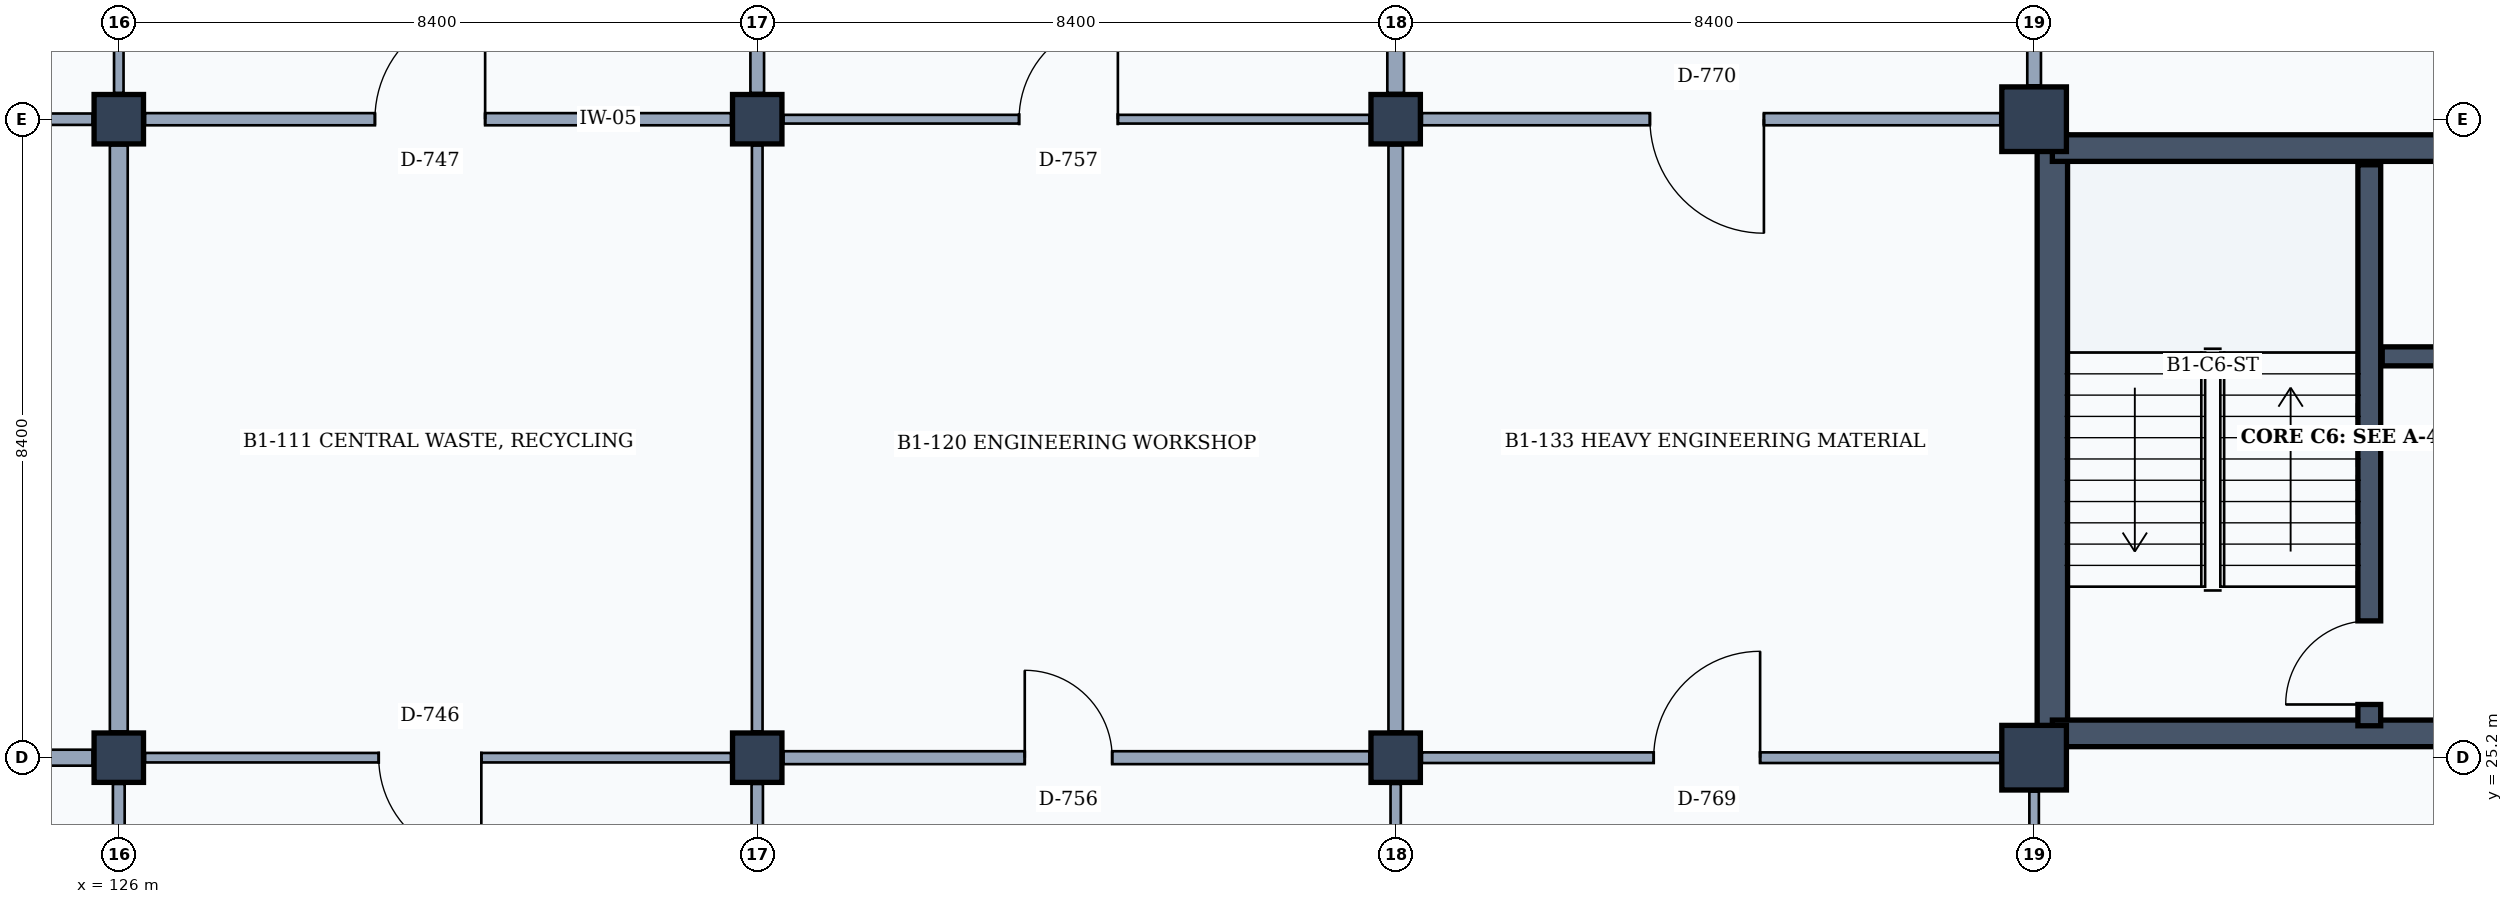
"""IFC4 building model, lengths in metres.
Left out: names, types, materials, properties, quantities, classifications, styles, units other than length and angle.
Written with IfcOpenShell. Run it as: python <this file> out.ifc"""

import sys

from ifc_helpers import new_model, si_unit, direction, frame, frame_2d, origin, origin_2d, place, context, subcontext, project, spatial, rectangle, extrude, element, fill, save


model = new_model("IFC4")
c1 = context("Model", 3, precision=1e-05, world=origin(), true_north=direction((0.0, 1.0)))
c2 = subcontext(c1, "Body", "Model", "MODEL_VIEW")
j1 = project(units=[si_unit("LENGTHUNIT", "METRE"), si_unit("PLANEANGLEUNIT", "RADIAN")], contexts=[c1])
p1 = place(None, origin())
s1 = spatial("IfcSite", under=j1, at=p1, CompositionType="ELEMENT")
p2 = place(p1, origin())
s2 = spatial("IfcBuilding", under=s1, at=p2, CompositionType="ELEMENT")
p3 = place(p2, frame((0.0, 0.0, -4.2)))
s3 = spatial("IfcBuildingStorey", under=s2, at=p3, CompositionType="ELEMENT", Elevation=-4.2)
for number, where, z_axis, x_axis in (
    (1, (126.0, 25.2, 0.0), (0.0, 0.0, 1.0), (1.0, 0.0, 0.0)),
    (2, (126.0, 33.6, 0.0), (0.0, 0.0, 1.0), (1.0, 0.0, 0.0)),
    (3, (134.4, 25.2, 0.0), (0.0, 0.0, 1.0), (1.0, 0.0, 0.0)),
    (4, (134.4, 33.6, 0.0), (0.0, 0.0, 1.0), (1.0, 0.0, 0.0)),
    (5, (142.8, 25.2, 0.0), (0.0, 0.0, 1.0), (1.0, 0.0, 0.0)),
    (6, (142.8, 33.6, 0.0), (0.0, 0.0, 1.0), (1.0, 0.0, 0.0)),
):
    element("IfcColumn", number, at=place(p3, frame(where, z_axis=z_axis, x_axis=x_axis)), inside=s3, PredefinedType="COLUMN", context=c2, shape_type="SweptSolid", body=[
        extrude(rectangle(XDim=0.65, YDim=0.65, at=origin_2d()), origin(), (0.0, 0.0, 1.0), 4.2),
    ])
for number, where, z_axis, x_axis in (
    (7, (151.2, 25.2, 0.0), (0.0, 0.0, 1.0), (1.0, 0.0, 0.0)),
    (8, (151.2, 33.6, 0.0), (0.0, 0.0, 1.0), (1.0, 0.0, 0.0)),
):
    element("IfcColumn", number, at=place(p3, frame(where, z_axis=z_axis, x_axis=x_axis)), inside=s3, PredefinedType="COLUMN", context=c2, shape_type="SweptSolid", body=[
        extrude(rectangle(XDim=0.85, YDim=0.85, at=origin_2d()), origin(), (0.0, 0.0, 1.0), 4.2),
    ])
p4 = place(p3, frame((151.44, 25.45, 0.0), z_axis=(0.0, 0.0, 1.0), x_axis=(0.0, 1.0, 0.0)))
e9 = element("IfcWall", 9, at=p4, inside=s3, PredefinedType="SHEAR", context=c2, shape_type="SweptSolid", body=[
    extrude(rectangle(XDim=7.94, YDim=0.4, at=frame_2d((3.97, 0.0))), origin(), (0.0, 0.0, 1.0), 3.9),
])
for number, where, z_axis, x_axis in (
    (10, (151.44, 33.22, 0.0), (0.0, 0.0, 1.0), (1.0, 0.0, 0.0)),
    (11, (159.34, 25.52, 0.0), (0.0, 0.0, 1.0), (-1.0, 0.0, 0.0)),
):
    element("IfcWall", number, at=place(p3, frame(where, z_axis=z_axis, x_axis=x_axis)), inside=s3, PredefinedType="SHEAR", context=c2, shape_type="SweptSolid", body=[
        extrude(rectangle(XDim=7.9, YDim=0.35, at=frame_2d((3.95, 0.0))), origin(), (0.0, 0.0, 1.0), 3.9),
    ])
p5 = place(p3, frame((155.61, 25.62, 0.0), z_axis=(0.0, 0.0, 1.0), x_axis=(0.0, 1.0, 0.0)))
e12 = element("IfcWall", 12, at=p5, inside=s3, PredefinedType="SHEAR", context=c2, shape_type="SweptSolid", body=[
    extrude(rectangle(XDim=7.38, YDim=0.3, at=frame_2d((3.69, 0.0))), origin(), (0.0, 0.0, 1.0), 3.9),
])
p6 = place(p5, frame((0.28, 0.0, 0.0)))
e13 = element("IfcOpeningElement", 13, at=p6, cuts=e12, PredefinedType="OPENING", context=c2, shape_type="SweptSolid", body=[
    extrude(rectangle(XDim=1.1, YDim=2.15, at=frame_2d((0.55, 1.075))), frame((0.0, 0.16, 0.0), z_axis=(0.0, -1.0, 0.0), x_axis=(1.0, 0.0, 0.0)), (0.0, 0.0, 1.0), 0.32),
])
p7 = place(p3, frame((155.78, 30.48, 0.0), z_axis=(0.0, 0.0, 1.0), x_axis=(1.0, 0.0, 0.0)))
e14 = element("IfcWall", 14, at=p7, inside=s3, PredefinedType="SHEAR", context=c2, shape_type="SweptSolid", body=[
    extrude(rectangle(XDim=3.46, YDim=0.25, at=frame_2d((1.73, 0.0))), origin(), (0.0, 0.0, 1.0), 3.9),
])
p8 = place(p7, frame((1.1, 0.0, 0.0)))
e15 = element("IfcOpeningElement", 15, at=p8, cuts=e14, PredefinedType="OPENING", context=c2, shape_type="SweptSolid", body=[
    extrude(rectangle(XDim=1.1, YDim=2.15, at=frame_2d((0.55, 1.075))), frame((0.0, 0.135, 0.0), z_axis=(0.0, -1.0, 0.0), x_axis=(1.0, 0.0, 0.0)), (0.0, 0.0, 1.0), 0.27),
])
p9 = place(p3, frame((126.0, 17.095, 0.0), z_axis=(0.0, 0.0, 1.0), x_axis=(0.0, 1.0, 0.0)))
e16 = element("IfcWall", 16, at=p9, inside=s3, PredefinedType="PARTITIONING", context=c2, shape_type="SweptSolid", body=[
    extrude(rectangle(XDim=7.76, YDim=0.155, at=frame_2d((3.88, 0.0))), origin(), (0.0, 0.0, 1.0), 3.25),
])
p10 = place(p3, frame((117.945, 25.2, 0.0), z_axis=(0.0, 0.0, 1.0), x_axis=(1.0, 0.0, 0.0)))
e17 = element("IfcWall", 17, at=p10, inside=s3, PredefinedType="PARTITIONING", context=c2, shape_type="SweptSolid", body=[
    extrude(rectangle(XDim=7.71, YDim=0.21, at=frame_2d((3.855, 0.0))), origin(), (0.0, 0.0, 1.0), 2.95),
])
p11 = place(p10, frame((3.0, 0.0, 0.0)))
e18 = element("IfcOpeningElement", 18, at=p11, cuts=e17, PredefinedType="OPENING", context=c2, shape_type="SweptSolid", body=[
    extrude(rectangle(XDim=1.5, YDim=2.3, at=frame_2d((0.75, 1.15))), frame((0.0, 0.115, 0.0), z_axis=(0.0, -1.0, 0.0), x_axis=(1.0, 0.0, 0.0)), (0.0, 0.0, 1.0), 0.23),
])
p12 = place(p3, frame((126.0, 25.545, 0.0), z_axis=(0.0, 0.0, 1.0), x_axis=(0.0, 1.0, 0.0)))
e19 = element("IfcWall", 19, at=p12, inside=s3, PredefinedType="PARTITIONING", context=c2, shape_type="SweptSolid", body=[
    extrude(rectangle(XDim=7.71, YDim=0.235, at=frame_2d((3.855, 0.0))), origin(), (0.0, 0.0, 1.0), 3.25),
])
p13 = place(p3, frame((117.945, 33.6, 0.0), z_axis=(0.0, 0.0, 1.0), x_axis=(1.0, 0.0, 0.0)))
e20 = element("IfcWall", 20, at=p13, inside=s3, PredefinedType="PARTITIONING", context=c2, shape_type="SweptSolid", body=[
    extrude(rectangle(XDim=7.71, YDim=0.15, at=frame_2d((3.855, 0.0))), origin(), (0.0, 0.0, 1.0), 2.95),
])
p14 = place(p13, frame((2.925, 0.0, 0.0)))
e21 = element("IfcOpeningElement", 21, at=p14, cuts=e20, PredefinedType="OPENING", context=c2, shape_type="SweptSolid", body=[
    extrude(rectangle(XDim=1.65, YDim=2.25, at=frame_2d((0.825, 1.125))), frame((0.0, 0.085, 0.0), z_axis=(0.0, -1.0, 0.0), x_axis=(1.0, 0.0, 0.0)), (0.0, 0.0, 1.0), 0.17),
])
p15 = place(p3, frame((126.0, 33.945, 0.0), z_axis=(0.0, 0.0, 1.0), x_axis=(0.0, 1.0, 0.0)))
e22 = element("IfcWall", 22, at=p15, inside=s3, PredefinedType="PARTITIONING", context=c2, shape_type="SweptSolid", body=[
    extrude(rectangle(XDim=7.71, YDim=0.125, at=frame_2d((3.855, 0.0))), origin(), (0.0, 0.0, 1.0), 3.25),
])
p16 = place(p3, frame((134.4, 17.145, 0.0), z_axis=(0.0, 0.0, 1.0), x_axis=(0.0, 1.0, 0.0)))
e23 = element("IfcWall", 23, at=p16, inside=s3, PredefinedType="PARTITIONING", context=c2, shape_type="SweptSolid", body=[
    extrude(rectangle(XDim=7.71, YDim=0.15, at=frame_2d((3.855, 0.0))), origin(), (0.0, 0.0, 1.0), 3.1),
])
p17 = place(p3, frame((126.345, 25.2, 0.0), z_axis=(0.0, 0.0, 1.0), x_axis=(1.0, 0.0, 0.0)))
e24 = element("IfcWall", 24, at=p17, inside=s3, PredefinedType="PARTITIONING", context=c2, shape_type="SweptSolid", body=[
    extrude(rectangle(XDim=7.71, YDim=0.125, at=frame_2d((3.855, 0.0))), origin(), (0.0, 0.0, 1.0), 2.95),
])
p18 = place(p17, frame((3.075, 0.0, 0.0)))
e25 = element("IfcOpeningElement", 25, at=p18, cuts=e24, PredefinedType="OPENING", context=c2, shape_type="SweptSolid", body=[
    extrude(rectangle(XDim=1.35, YDim=2.25, at=frame_2d((0.675, 1.125))), frame((0.0, 0.073, 0.0), z_axis=(0.0, -1.0, 0.0), x_axis=(1.0, 0.0, 0.0)), (0.0, 0.0, 1.0), 0.145),
])
p19 = place(p3, frame((134.4, 25.545, 0.0), z_axis=(0.0, 0.0, 1.0), x_axis=(0.0, 1.0, 0.0)))
e26 = element("IfcWall", 26, at=p19, inside=s3, PredefinedType="PARTITIONING", context=c2, shape_type="SweptSolid", body=[
    extrude(rectangle(XDim=7.71, YDim=0.14, at=frame_2d((3.855, 0.0))), origin(), (0.0, 0.0, 1.0), 3.1),
])
p20 = place(p3, frame((126.345, 33.6, 0.0), z_axis=(0.0, 0.0, 1.0), x_axis=(1.0, 0.0, 0.0)))
e27 = element("IfcWall", 27, at=p20, inside=s3, PredefinedType="PARTITIONING", context=c2, shape_type="SweptSolid", body=[
    extrude(rectangle(XDim=7.71, YDim=0.16, at=frame_2d((3.855, 0.0))), origin(), (0.0, 0.0, 1.0), 2.95),
])
p21 = place(p20, frame((3.025, 0.0, 0.0)))
e28 = element("IfcOpeningElement", 28, at=p21, cuts=e27, PredefinedType="OPENING", context=c2, shape_type="SweptSolid", body=[
    extrude(rectangle(XDim=1.45, YDim=2.35, at=frame_2d((0.725, 1.175))), frame((0.0, 0.09, 0.0), z_axis=(0.0, -1.0, 0.0), x_axis=(1.0, 0.0, 0.0)), (0.0, 0.0, 1.0), 0.18),
])
p22 = place(p3, frame((134.4, 33.945, 0.0), z_axis=(0.0, 0.0, 1.0), x_axis=(0.0, 1.0, 0.0)))
e29 = element("IfcWall", 29, at=p22, inside=s3, PredefinedType="PARTITIONING", context=c2, shape_type="SweptSolid", body=[
    extrude(rectangle(XDim=7.71, YDim=0.18, at=frame_2d((3.855, 0.0))), origin(), (0.0, 0.0, 1.0), 3.1),
])
p23 = place(p3, frame((142.8, 17.145, 0.0), z_axis=(0.0, 0.0, 1.0), x_axis=(0.0, 1.0, 0.0)))
e30 = element("IfcWall", 30, at=p23, inside=s3, PredefinedType="PARTITIONING", context=c2, shape_type="SweptSolid", body=[
    extrude(rectangle(XDim=7.71, YDim=0.135, at=frame_2d((3.855, 0.0))), origin(), (0.0, 0.0, 1.0), 3.1),
])
p24 = place(p3, frame((134.745, 25.2, 0.0), z_axis=(0.0, 0.0, 1.0), x_axis=(1.0, 0.0, 0.0)))
e31 = element("IfcWall", 31, at=p24, inside=s3, PredefinedType="PARTITIONING", context=c2, shape_type="SweptSolid", body=[
    extrude(rectangle(XDim=7.71, YDim=0.17, at=frame_2d((3.855, 0.0))), origin(), (0.0, 0.0, 1.0), 3.05),
])
p25 = place(p24, frame((3.175, 0.0, 0.0)))
e32 = element("IfcOpeningElement", 32, at=p25, cuts=e31, PredefinedType="OPENING", context=c2, shape_type="SweptSolid", body=[
    extrude(rectangle(XDim=1.15, YDim=2.25, at=frame_2d((0.575, 1.125))), frame((0.0, 0.095, 0.0), z_axis=(0.0, -1.0, 0.0), x_axis=(1.0, 0.0, 0.0)), (0.0, 0.0, 1.0), 0.19),
])
p26 = place(p3, frame((142.8, 25.545, 0.0), z_axis=(0.0, 0.0, 1.0), x_axis=(0.0, 1.0, 0.0)))
e33 = element("IfcWall", 33, at=p26, inside=s3, PredefinedType="PARTITIONING", context=c2, shape_type="SweptSolid", body=[
    extrude(rectangle(XDim=7.71, YDim=0.19, at=frame_2d((3.855, 0.0))), origin(), (0.0, 0.0, 1.0), 3.1),
])
p27 = place(p3, frame((134.745, 33.6, 0.0), z_axis=(0.0, 0.0, 1.0), x_axis=(1.0, 0.0, 0.0)))
e34 = element("IfcWall", 34, at=p27, inside=s3, PredefinedType="PARTITIONING", context=c2, shape_type="SweptSolid", body=[
    extrude(rectangle(XDim=7.71, YDim=0.115, at=frame_2d((3.855, 0.0))), origin(), (0.0, 0.0, 1.0), 3.05),
])
p28 = place(p27, frame((3.1, 0.0, 0.0)))
e35 = element("IfcOpeningElement", 35, at=p28, cuts=e34, PredefinedType="OPENING", context=c2, shape_type="SweptSolid", body=[
    extrude(rectangle(XDim=1.3, YDim=2.2, at=frame_2d((0.65, 1.1))), frame((0.0, 0.067, 0.0), z_axis=(0.0, -1.0, 0.0), x_axis=(1.0, 0.0, 0.0)), (0.0, 0.0, 1.0), 0.135),
])
p29 = place(p3, frame((142.8, 33.945, 0.0), z_axis=(0.0, 0.0, 1.0), x_axis=(0.0, 1.0, 0.0)))
e36 = element("IfcWall", 36, at=p29, inside=s3, PredefinedType="PARTITIONING", context=c2, shape_type="SweptSolid", body=[
    extrude(rectangle(XDim=7.71, YDim=0.22, at=frame_2d((3.855, 0.0))), origin(), (0.0, 0.0, 1.0), 3.1),
])
p30 = place(p3, frame((151.2, 17.145, 0.0), z_axis=(0.0, 0.0, 1.0), x_axis=(0.0, 1.0, 0.0)))
e37 = element("IfcWall", 37, at=p30, inside=s3, PredefinedType="PARTITIONING", context=c2, shape_type="SweptSolid", body=[
    extrude(rectangle(XDim=7.61, YDim=0.125, at=frame_2d((3.805, 0.0))), origin(), (0.0, 0.0, 1.0), 3.1),
])
p31 = place(p3, frame((143.145, 25.2, 0.0), z_axis=(0.0, 0.0, 1.0), x_axis=(1.0, 0.0, 0.0)))
e38 = element("IfcWall", 38, at=p31, inside=s3, PredefinedType="PARTITIONING", context=c2, shape_type="SweptSolid", body=[
    extrude(rectangle(XDim=7.61, YDim=0.14, at=frame_2d((3.805, 0.0))), origin(), (0.0, 0.0, 1.0), 3.05),
])
p32 = place(p31, frame((3.05, 0.0, 0.0)))
e39 = element("IfcOpeningElement", 39, at=p32, cuts=e38, PredefinedType="OPENING", context=c2, shape_type="SweptSolid", body=[
    extrude(rectangle(XDim=1.4, YDim=2.25, at=frame_2d((0.7, 1.125))), frame((0.0, 0.08, 0.0), z_axis=(0.0, -1.0, 0.0), x_axis=(1.0, 0.0, 0.0)), (0.0, 0.0, 1.0), 0.16),
])
p33 = place(p3, frame((143.145, 33.6, 0.0), z_axis=(0.0, 0.0, 1.0), x_axis=(1.0, 0.0, 0.0)))
e40 = element("IfcWall", 40, at=p33, inside=s3, PredefinedType="PARTITIONING", context=c2, shape_type="SweptSolid", body=[
    extrude(rectangle(XDim=7.61, YDim=0.16, at=frame_2d((3.805, 0.0))), origin(), (0.0, 0.0, 1.0), 3.05),
])
p34 = place(p33, frame((3.0, 0.0, 0.0)))
e41 = element("IfcOpeningElement", 41, at=p34, cuts=e40, PredefinedType="OPENING", context=c2, shape_type="SweptSolid", body=[
    extrude(rectangle(XDim=1.5, YDim=2.3, at=frame_2d((0.75, 1.15))), frame((0.0, 0.09, 0.0), z_axis=(0.0, -1.0, 0.0), x_axis=(1.0, 0.0, 0.0)), (0.0, 0.0, 1.0), 0.18),
])
p35 = place(p3, frame((151.2, 34.045, 0.0), z_axis=(0.0, 0.0, 1.0), x_axis=(0.0, 1.0, 0.0)))
e42 = element("IfcWall", 42, at=p35, inside=s3, PredefinedType="PARTITIONING", context=c2, shape_type="SweptSolid", body=[
    extrude(rectangle(XDim=7.61, YDim=0.18, at=frame_2d((3.805, 0.0))), origin(), (0.0, 0.0, 1.0), 3.1),
])
p36 = place(p6, origin())
e43 = element("IfcDoor", 43, at=p36, inside=s3, OperationType="SINGLE_SWING_LEFT", PredefinedType="DOOR", context=c2, shape_type="SweptSolid", body=[
    extrude(rectangle(XDim=1.1, YDim=2.15, at=frame_2d((0.55, 1.075))), frame((0.0, 0.025, 0.0), z_axis=(0.0, -1.0, 0.0), x_axis=(1.0, 0.0, 0.0)), (0.0, 0.0, 1.0), 0.05),
])
fill(e13, e43)
p37 = place(p18, frame((1.35, 0.0, 0.0), z_axis=(0.0, 0.0, 1.0), x_axis=(-1.0, 0.0, 0.0)))
e44 = element("IfcDoor", 44, at=p37, inside=s3, OperationType="SINGLE_SWING_LEFT", PredefinedType="DOOR", context=c2, shape_type="SweptSolid", body=[
    extrude(rectangle(XDim=1.35, YDim=2.25, at=frame_2d((0.675, 1.125))), frame((0.0, 0.025, 0.0), z_axis=(0.0, -1.0, 0.0), x_axis=(1.0, 0.0, 0.0)), (0.0, 0.0, 1.0), 0.05),
])
fill(e25, e44)
p38 = place(p21, origin())
e45 = element("IfcDoor", 45, at=p38, inside=s3, OperationType="SINGLE_SWING_RIGHT", PredefinedType="DOOR", context=c2, shape_type="SweptSolid", body=[
    extrude(rectangle(XDim=1.45, YDim=2.35, at=frame_2d((0.725, 1.175))), frame((0.0, 0.025, 0.0), z_axis=(0.0, -1.0, 0.0), x_axis=(1.0, 0.0, 0.0)), (0.0, 0.0, 1.0), 0.05),
])
fill(e28, e45)
p39 = place(p25, origin())
e46 = element("IfcDoor", 46, at=p39, inside=s3, OperationType="SINGLE_SWING_LEFT", PredefinedType="DOOR", context=c2, shape_type="SweptSolid", body=[
    extrude(rectangle(XDim=1.15, YDim=2.25, at=frame_2d((0.575, 1.125))), frame((0.0, 0.025, 0.0), z_axis=(0.0, -1.0, 0.0), x_axis=(1.0, 0.0, 0.0)), (0.0, 0.0, 1.0), 0.05),
])
fill(e32, e46)
p40 = place(p28, origin())
e47 = element("IfcDoor", 47, at=p40, inside=s3, OperationType="SINGLE_SWING_RIGHT", PredefinedType="DOOR", context=c2, shape_type="SweptSolid", body=[
    extrude(rectangle(XDim=1.3, YDim=2.2, at=frame_2d((0.65, 1.1))), frame((0.0, 0.025, 0.0), z_axis=(0.0, -1.0, 0.0), x_axis=(1.0, 0.0, 0.0)), (0.0, 0.0, 1.0), 0.05),
])
fill(e35, e47)
p41 = place(p32, origin())
e48 = element("IfcDoor", 48, at=p41, inside=s3, OperationType="SINGLE_SWING_RIGHT", PredefinedType="DOOR", context=c2, shape_type="SweptSolid", body=[
    extrude(rectangle(XDim=1.4, YDim=2.25, at=frame_2d((0.7, 1.125))), frame((0.0, 0.025, 0.0), z_axis=(0.0, -1.0, 0.0), x_axis=(1.0, 0.0, 0.0)), (0.0, 0.0, 1.0), 0.05),
])
fill(e39, e48)
p42 = place(p34, frame((1.5, 0.0, 0.0), z_axis=(0.0, 0.0, 1.0), x_axis=(-1.0, 0.0, 0.0)))
e49 = element("IfcDoor", 49, at=p42, inside=s3, OperationType="SINGLE_SWING_LEFT", PredefinedType="DOOR", context=c2, shape_type="SweptSolid", body=[
    extrude(rectangle(XDim=1.5, YDim=2.3, at=frame_2d((0.75, 1.15))), frame((0.0, 0.025, 0.0), z_axis=(0.0, -1.0, 0.0), x_axis=(1.0, 0.0, 0.0)), (0.0, 0.0, 1.0), 0.05),
])
fill(e41, e49)
save(model, sys.argv[1])
